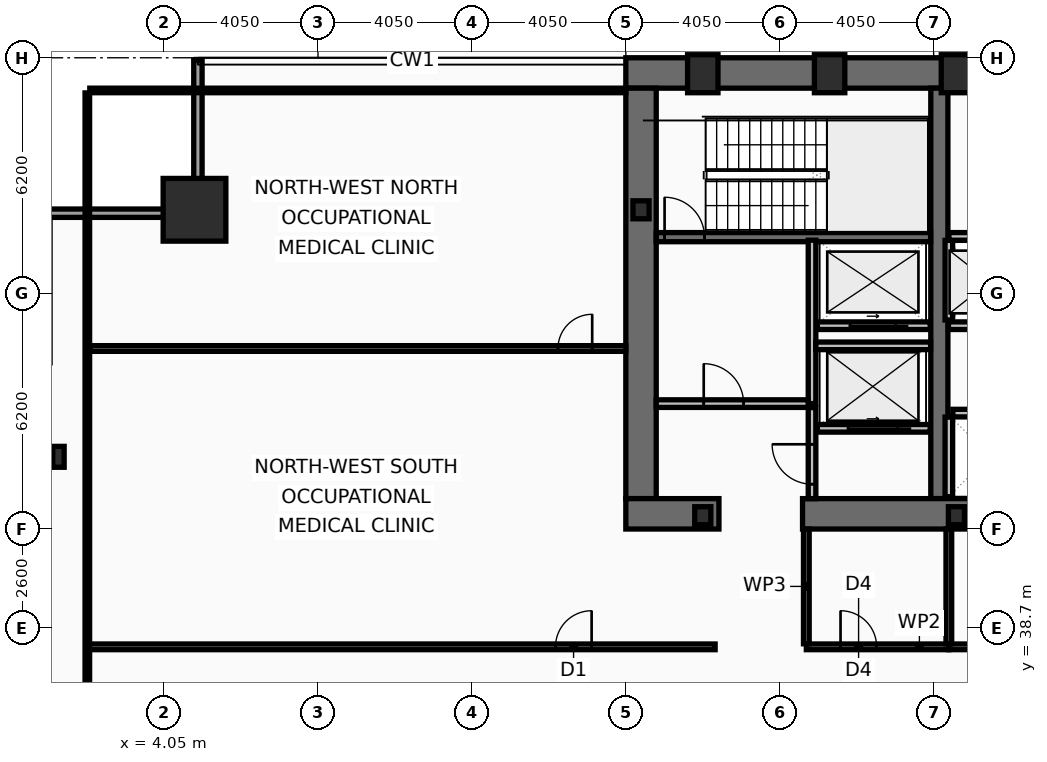
"""IFC4 building model, lengths in metres.
Left out: names, types, materials, properties, quantities, classifications, styles, units other than length and angle.
Written with IfcOpenShell. Run it as: python <this file> out.ifc"""

import sys

from ifc_helpers import new_model, si_unit, direction, frame, frame_2d, origin, origin_2d, place, context, subcontext, project, spatial, rectangle, hollow_rectangle, i_section, extrude, element, fill, save


model = new_model("IFC4")
c1 = context("Model", 3, precision=1e-05, world=origin(), true_north=direction((0.0, 1.0)))
c2 = subcontext(c1, "Body", "Model", "MODEL_VIEW")
j1 = project(units=[si_unit("LENGTHUNIT", "METRE"), si_unit("PLANEANGLEUNIT", "RADIAN")], contexts=[c1])
p1 = place(None, origin())
s1 = spatial("IfcSite", under=j1, at=p1, CompositionType="ELEMENT")
p2 = place(p1, origin())
s2 = spatial("IfcBuilding", under=s1, at=p2, CompositionType="ELEMENT")
p3 = place(p2, frame((0.0, 0.0, 69.8)))
s3 = spatial("IfcBuildingStorey", under=s2, at=p3, CompositionType="ELEMENT", Elevation=69.8)
p4 = place(p3, frame((16.2, 53.3, 0.0), z_axis=(0.0, 0.0, 1.0), x_axis=(1.0, 0.0, 0.0)))
e1 = element("IfcWall", 1, at=p4, inside=s3, PredefinedType="SHEAR", context=c2, shape_type="SweptSolid", body=[
    extrude(rectangle(XDim=40.5, YDim=0.8, at=frame_2d((20.25, 0.0))), origin(), (0.0, 0.0, 1.0), 3.82),
])
p5 = place(p3, frame((16.6, 42.1, 0.0), z_axis=(0.0, 0.0, 1.0), x_axis=(0.0, 1.0, 0.0)))
e2 = element("IfcWall", 2, at=p5, inside=s3, PredefinedType="SHEAR", context=c2, shape_type="SweptSolid", body=[
    extrude(rectangle(XDim=10.8, YDim=0.8, at=frame_2d((5.4, 0.0))), origin(), (0.0, 0.0, 1.0), 3.82),
])
p6 = place(p3, frame((24.45, 42.1, 0.0), z_axis=(0.0, 0.0, 1.0), x_axis=(0.0, 1.0, 0.0)))
e3 = element("IfcWall", 3, at=p6, inside=s3, PredefinedType="SHEAR", context=c2, shape_type="SweptSolid", body=[
    extrude(rectangle(XDim=10.8, YDim=0.45, at=frame_2d((5.4, 0.0))), origin(), (0.0, 0.0, 1.0), 3.82),
])
p7 = place(p3, frame((18.65, 41.7, 0.0), z_axis=(0.0, 0.0, 1.0), x_axis=(-1.0, 0.0, 0.0)))
e4 = element("IfcWall", 4, at=p7, inside=s3, PredefinedType="SHEAR", context=c2, shape_type="SweptSolid", body=[
    extrude(rectangle(XDim=2.45, YDim=0.8, at=frame_2d((1.225, 0.0))), origin(), (0.0, 0.0, 1.0), 3.82),
])
p8 = place(p3, frame((32.3, 41.7, 0.0), z_axis=(0.0, 0.0, 1.0), x_axis=(-1.0, 0.0, 0.0)))
e5 = element("IfcWall", 5, at=p8, inside=s3, PredefinedType="SHEAR", context=c2, shape_type="SweptSolid", body=[
    extrude(rectangle(XDim=11.45, YDim=0.8, at=frame_2d((5.725, 0.0))), origin(), (0.0, 0.0, 1.0), 3.82),
])
p9 = place(p3, frame((17.0, 48.98, 0.0), z_axis=(0.0, 0.0, 1.0), x_axis=(1.0, 0.0, 0.0)))
e6 = element("IfcWall", 6, at=p9, inside=s3, PredefinedType="SHEAR", context=c2, shape_type="SweptSolid", body=[
    extrude(rectangle(XDim=7.22, YDim=0.24, at=frame_2d((3.61, 0.0))), origin(), (0.0, 0.0, 1.0), 3.82),
])
p10 = place(p9, frame((0.22, 0.0, 0.0)))
e7 = element("IfcOpeningElement", 7, at=p10, cuts=e6, PredefinedType="OPENING", context=c2, shape_type="SweptSolid", body=[
    extrude(rectangle(XDim=1.05, YDim=2.15, at=frame_2d((0.525, 1.075))), frame((0.0, 0.13, 0.0), z_axis=(0.0, -1.0, 0.0), x_axis=(1.0, 0.0, 0.0)), (0.0, 0.0, 1.0), 0.26),
])
p11 = place(p3, frame((4.85, 49.7, 0.0), z_axis=(0.0, 0.0, 1.0), x_axis=(1.0, 0.0, 0.0)))
e8 = element("IfcColumn", 8, at=p11, inside=s3, PredefinedType="COLUMN", context=c2, shape_type="SweptSolid", body=[
    extrude(hollow_rectangle(XDim=1.65, YDim=1.65, WallThickness=0.075, at=origin_2d()), origin(), (0.0, 0.0, 1.0), 4.0),
])
for number, where, z_axis, x_axis in (
    (9, (18.225, 53.28, 0.0), (0.0, 0.0, 1.0), (1.0, 0.0, 0.0)),
    (10, (21.562, 53.28, 0.0), (0.0, 0.0, 1.0), (1.0, 0.0, 0.0)),
    (11, (24.9, 53.28, 0.0), (0.0, 0.0, 1.0), (1.0, 0.0, 0.0)),
):
    element("IfcColumn", number, at=place(p3, frame(where, z_axis=z_axis, x_axis=x_axis)), inside=s3, PredefinedType="COLUMN", context=c2, shape_type="SweptSolid", body=[
        extrude(hollow_rectangle(XDim=0.8, YDim=1.0, WallThickness=0.055, at=origin_2d()), origin(), (0.0, 0.0, 1.0), 4.0),
    ])
p12 = place(p3, frame((1.27, 43.2, 0.0), z_axis=(0.0, 0.0, 1.0), x_axis=(1.0, 0.0, 0.0)))
e12 = element("IfcColumn", 12, at=p12, inside=s3, PredefinedType="COLUMN", context=c2, shape_type="SweptSolid", body=[
    extrude(i_section(OverallWidth=0.3, OverallDepth=0.55, WebThickness=0.015, FlangeThickness=0.029, at=origin_2d()), origin(), (0.0, 0.0, 1.0), 4.0),
])
for number, where, z_axis, x_axis in (
    (13, (16.6, 49.7, 0.0), (0.0, 0.0, 1.0), (1.0, 0.0, 0.0)),
    (14, (18.225, 41.65, 0.0), (0.0, 0.0, 1.0), (1.0, 0.0, 0.0)),
    (15, (24.9, 41.65, 0.0), (0.0, 0.0, 1.0), (1.0, 0.0, 0.0)),
):
    element("IfcColumn", number, at=place(p3, frame(where, z_axis=z_axis, x_axis=x_axis)), inside=s3, PredefinedType="COLUMN", context=c2, shape_type="SweptSolid", body=[
        extrude(i_section(OverallWidth=0.424, OverallDepth=0.474, WebThickness=0.048, FlangeThickness=0.077, at=origin_2d()), origin(), (0.0, 0.0, 1.0), 4.0),
    ])
p13 = place(p3, frame((0.83, 49.61, 0.0), z_axis=(0.0, 0.0, 1.0), x_axis=(1.0, 0.0, 0.0)))
e16 = element("IfcWall", 16, at=p13, inside=s3, PredefinedType="SOLIDWALL", context=c2, shape_type="SweptSolid", body=[
    extrude(rectangle(XDim=4.22, YDim=0.22, at=frame_2d((2.11, 0.0))), origin(), (0.0, 0.0, 1.0), 3.16),
])
p14 = place(p3, frame((4.94, 49.72, 0.0), z_axis=(0.0, 0.0, 1.0), x_axis=(0.0, 1.0, 0.0)))
e17 = element("IfcWall", 17, at=p14, inside=s3, PredefinedType="SOLIDWALL", context=c2, shape_type="SweptSolid", body=[
    extrude(rectangle(XDim=3.91, YDim=0.22, at=frame_2d((1.955, 0.0))), origin(), (0.0, 0.0, 1.0), 3.16),
])
p15 = place(p3, frame((24.21, 43.95, 0.0), z_axis=(0.0, 0.0, 1.0), x_axis=(-1.0, 0.0, 0.0)))
e18 = element("IfcWall", 18, at=p15, inside=s3, PredefinedType="PARTITIONING", context=c2, shape_type="SweptSolid", body=[
    extrude(rectangle(XDim=2.97, YDim=0.2, at=frame_2d((1.485, 0.0))), origin(), (0.0, 0.0, 1.0), 3.82),
])
p16 = place(p15, frame((0.86, 0.0, 0.0)))
e19 = element("IfcOpeningElement", 19, at=p16, cuts=e18, PredefinedType="OPENING", context=c2, shape_type="SweptSolid", body=[
    extrude(rectangle(XDim=1.3, YDim=2.18, at=frame_2d((0.65, 1.09))), frame((0.0, 0.11, 0.0), z_axis=(0.0, -1.0, 0.0), x_axis=(1.0, 0.0, 0.0)), (0.0, 0.0, 1.0), 0.22),
])
p17 = place(p3, frame((24.21, 46.65, 0.0), z_axis=(0.0, 0.0, 1.0), x_axis=(-1.0, 0.0, 0.0)))
e20 = element("IfcWall", 20, at=p17, inside=s3, PredefinedType="PARTITIONING", context=c2, shape_type="SweptSolid", body=[
    extrude(rectangle(XDim=2.97, YDim=0.2, at=frame_2d((1.485, 0.0))), origin(), (0.0, 0.0, 1.0), 3.82),
])
p18 = place(p17, frame((0.91, 0.0, 0.0)))
e21 = element("IfcOpeningElement", 21, at=p18, cuts=e20, PredefinedType="OPENING", context=c2, shape_type="SweptSolid", body=[
    extrude(rectangle(XDim=1.2, YDim=2.18, at=frame_2d((0.6, 1.09))), frame((0.0, 0.11, 0.0), z_axis=(0.0, -1.0, 0.0), x_axis=(1.0, 0.0, 0.0)), (0.0, 0.0, 1.0), 0.22),
])
p19 = place(p3, frame((31.22, 46.65, 0.0), z_axis=(0.0, 0.0, 1.0), x_axis=(-1.0, 0.0, 0.0)))
e22 = element("IfcWall", 22, at=p19, inside=s3, PredefinedType="PARTITIONING", context=c2, shape_type="SweptSolid", body=[
    extrude(rectangle(XDim=6.53, YDim=0.2, at=frame_2d((3.265, 0.0))), origin(), (0.0, 0.0, 1.0), 3.82),
])
p20 = place(p19, frame((4.9, 0.0, 0.0)))
e23 = element("IfcOpeningElement", 23, at=p20, cuts=e22, PredefinedType="OPENING", context=c2, shape_type="SweptSolid", body=[
    extrude(rectangle(XDim=1.1, YDim=2.18, at=frame_2d((0.55, 1.09))), frame((0.0, 0.11, 0.0), z_axis=(0.0, -1.0, 0.0), x_axis=(1.0, 0.0, 0.0)), (0.0, 0.0, 1.0), 0.22),
])
p21 = place(p19, frame((2.74, 0.0, 0.0)))
e24 = element("IfcOpeningElement", 24, at=p21, cuts=e22, PredefinedType="OPENING", context=c2, shape_type="SweptSolid", body=[
    extrude(rectangle(XDim=1.1, YDim=2.18, at=frame_2d((0.55, 1.09))), frame((0.0, 0.11, 0.0), z_axis=(0.0, -1.0, 0.0), x_axis=(1.0, 0.0, 0.0)), (0.0, 0.0, 1.0), 0.22),
])
p22 = place(p19, frame((0.58, 0.0, 0.0)))
e25 = element("IfcOpeningElement", 25, at=p22, cuts=e22, PredefinedType="OPENING", context=c2, shape_type="SweptSolid", body=[
    extrude(rectangle(XDim=1.1, YDim=2.18, at=frame_2d((0.55, 1.09))), frame((0.0, 0.11, 0.0), z_axis=(0.0, -1.0, 0.0), x_axis=(1.0, 0.0, 0.0)), (0.0, 0.0, 1.0), 0.22),
])
p23 = place(p3, frame((21.1, 44.6, 0.0), z_axis=(0.0, 0.0, 1.0), x_axis=(0.0, 1.0, 0.0)))
e26 = element("IfcWall", 26, at=p23, inside=s3, PredefinedType="PARTITIONING", context=c2, shape_type="SweptSolid", body=[
    extrude(rectangle(XDim=4.3, YDim=0.2, at=frame_2d((2.15, 0.0))), origin(), (0.0, 0.0, 1.0), 3.82),
])
p24 = place(p3, frame((17.0, 44.6, 0.0), z_axis=(0.0, 0.0, 1.0), x_axis=(1.0, 0.0, 0.0)))
e27 = element("IfcWall", 27, at=p24, inside=s3, PredefinedType="PARTITIONING", context=c2, shape_type="SweptSolid", body=[
    extrude(rectangle(XDim=4.0, YDim=0.2, at=frame_2d((2.0, 0.0))), origin(), (0.0, 0.0, 1.0), 3.82),
])
p25 = place(p24, frame((1.25, 0.0, 0.0)))
e28 = element("IfcOpeningElement", 28, at=p25, cuts=e27, PredefinedType="OPENING", context=c2, shape_type="SweptSolid", body=[
    extrude(rectangle(XDim=1.05, YDim=2.15, at=frame_2d((0.525, 1.075))), frame((0.0, 0.11, 0.0), z_axis=(0.0, -1.0, 0.0), x_axis=(1.0, 0.0, 0.0)), (0.0, 0.0, 1.0), 0.22),
])
p26 = place(p3, frame((21.2, 46.12, 0.0), z_axis=(0.0, 0.0, 1.0), x_axis=(1.0, 0.0, 0.0)))
e29 = element("IfcWall", 29, at=p26, inside=s3, PredefinedType="PARTITIONING", context=c2, shape_type="SweptSolid", body=[
    extrude(rectangle(XDim=3.02, YDim=0.2, at=frame_2d((1.51, 0.0))), origin(), (0.0, 0.0, 1.0), 3.82),
])
p27 = place(p3, frame((21.1, 42.1, 0.0), z_axis=(0.0, 0.0, 1.0), x_axis=(0.0, 1.0, 0.0)))
e30 = element("IfcWall", 30, at=p27, inside=s3, PredefinedType="PARTITIONING", context=c2, shape_type="SweptSolid", body=[
    extrude(rectangle(XDim=2.395, YDim=0.2, at=frame_2d((1.198, 0.0))), origin(), (0.0, 0.0, 1.0), 3.82),
])
p28 = place(p27, frame((0.38, 0.0, 0.0)))
e31 = element("IfcOpeningElement", 31, at=p28, cuts=e30, PredefinedType="OPENING", context=c2, shape_type="SweptSolid", body=[
    extrude(rectangle(XDim=1.05, YDim=2.15, at=frame_2d((0.525, 1.075))), frame((0.0, 0.11, 0.0), z_axis=(0.0, -1.0, 0.0), x_axis=(1.0, 0.0, 0.0)), (0.0, 0.0, 1.0), 0.22),
])
p29 = place(p3, frame((24.7, 46.8, 0.0), z_axis=(0.0, 0.0, 1.0), x_axis=(0.0, 1.0, 0.0)))
e32 = element("IfcWall", 32, at=p29, inside=s3, PredefinedType="PARTITIONING", context=c2, shape_type="SweptSolid", body=[
    extrude(rectangle(XDim=2.095, YDim=0.2, at=frame_2d((1.047, 0.0))), origin(), (0.0, 0.0, 1.0), 3.82),
])
p30 = place(p3, frame((24.805, 44.35, 0.0), z_axis=(0.0, 0.0, 1.0), x_axis=(1.0, 0.0, 0.0)))
e33 = element("IfcWall", 33, at=p30, inside=s3, PredefinedType="PARTITIONING", context=c2, shape_type="SweptSolid", body=[
    extrude(rectangle(XDim=6.27, YDim=0.2, at=frame_2d((3.135, 0.0))), origin(), (0.0, 0.0, 1.0), 3.82),
])
p31 = place(p3, frame((24.7, 42.15, 0.0), z_axis=(0.0, 0.0, 1.0), x_axis=(0.0, 1.0, 0.0)))
e34 = element("IfcWall", 34, at=p31, inside=s3, PredefinedType="PARTITIONING", context=c2, shape_type="SweptSolid", body=[
    extrude(rectangle(XDim=2.095, YDim=0.2, at=frame_2d((1.048, 0.0))), origin(), (0.0, 0.0, 1.0), 3.82),
])
p32 = place(p3, frame((24.7, 52.86, 0.0), z_axis=(0.0, 0.0, 1.0), x_axis=(1.0, 0.0, 0.0)))
e35 = element("IfcWall", 35, at=p32, inside=s3, PredefinedType="PARTITIONING", context=c2, shape_type="SweptSolid", body=[
    extrude(rectangle(XDim=7.72, YDim=0.12, at=frame_2d((3.86, 0.0))), origin(), (0.0, 0.0, 1.0), 3.82),
])
p33 = place(p3, frame((24.7, 49.0, 0.0), z_axis=(0.0, 0.0, 1.0), x_axis=(1.0, 0.0, 0.0)))
e36 = element("IfcWall", 36, at=p33, inside=s3, PredefinedType="PARTITIONING", context=c2, shape_type="SweptSolid", body=[
    extrude(rectangle(XDim=7.72, YDim=0.2, at=frame_2d((3.86, 0.0))), origin(), (0.0, 0.0, 1.0), 3.82),
])
p34 = place(p33, frame((6.56, 0.0, 0.0)))
e37 = element("IfcOpeningElement", 37, at=p34, cuts=e36, PredefinedType="OPENING", context=c2, shape_type="SweptSolid", body=[
    extrude(rectangle(XDim=0.95, YDim=2.1, at=frame_2d((0.475, 1.05))), frame((0.0, 0.11, 0.0), z_axis=(0.0, -1.0, 0.0), x_axis=(1.0, 0.0, 0.0)), (0.0, 0.0, 1.0), 0.22),
])
p35 = place(p3, frame((20.95, 38.2, 0.0), z_axis=(0.0, 0.0, 1.0), x_axis=(1.0, 0.0, 0.0)))
e38 = element("IfcWall", 38, at=p35, inside=s3, PredefinedType="PARTITIONING", context=c2, shape_type="SweptSolid", body=[
    extrude(rectangle(XDim=3.75, YDim=0.15, at=frame_2d((1.875, 0.0))), origin(), (0.0, 0.0, 1.0), 3.01),
])
p36 = place(p35, frame((0.9, 0.0, 0.0)))
e39 = element("IfcOpeningElement", 39, at=p36, cuts=e38, PredefinedType="OPENING", context=c2, shape_type="SweptSolid", body=[
    extrude(rectangle(XDim=0.95, YDim=2.05, at=frame_2d((0.475, 1.025))), frame((0.0, 0.085, 0.0), z_axis=(0.0, -1.0, 0.0), x_axis=(1.0, 0.0, 0.0)), (0.0, 0.0, 1.0), 0.17),
])
p37 = place(p3, frame((24.7, 38.2, 0.0), z_axis=(0.0, 0.0, 1.0), x_axis=(1.0, 0.0, 0.0)))
e40 = element("IfcWall", 40, at=p37, inside=s3, PredefinedType="PARTITIONING", context=c2, shape_type="SweptSolid", body=[
    extrude(rectangle(XDim=4.5, YDim=0.15, at=frame_2d((2.25, 0.0))), origin(), (0.0, 0.0, 1.0), 3.01),
])
p38 = place(p37, frame((0.9, 0.0, 0.0)))
e41 = element("IfcOpeningElement", 41, at=p38, cuts=e40, PredefinedType="OPENING", context=c2, shape_type="SweptSolid", body=[
    extrude(rectangle(XDim=0.95, YDim=2.05, at=frame_2d((0.475, 1.025))), frame((0.0, 0.085, 0.0), z_axis=(0.0, -1.0, 0.0), x_axis=(1.0, 0.0, 0.0)), (0.0, 0.0, 1.0), 0.17),
])
p39 = place(p3, frame((20.95, 38.28, 0.0), z_axis=(0.0, 0.0, 1.0), x_axis=(0.0, 1.0, 0.0)))
e42 = element("IfcWall", 42, at=p39, inside=s3, PredefinedType="PARTITIONING", context=c2, shape_type="SweptSolid", body=[
    extrude(rectangle(XDim=3.02, YDim=0.15, at=frame_2d((1.51, 0.0))), origin(), (0.0, 0.0, 1.0), 3.82),
])
p40 = place(p3, frame((24.7, 38.28, 0.0), z_axis=(0.0, 0.0, 1.0), x_axis=(0.0, 1.0, 0.0)))
e43 = element("IfcWall", 43, at=p40, inside=s3, PredefinedType="PARTITIONING", context=c2, shape_type="SweptSolid", body=[
    extrude(rectangle(XDim=3.02, YDim=0.15, at=frame_2d((1.51, 0.0))), origin(), (0.0, 0.0, 1.0), 3.01),
])
p41 = place(p3, frame((2.03, 38.2, 0.0), z_axis=(0.0, 0.0, 1.0), x_axis=(1.0, 0.0, 0.0)))
e44 = element("IfcWall", 44, at=p41, inside=s3, PredefinedType="PARTITIONING", context=c2, shape_type="SweptSolid", body=[
    extrude(rectangle(XDim=16.52, YDim=0.15, at=frame_2d((8.26, 0.0))), origin(), (0.0, 0.0, 1.0), 3.01),
])
p42 = place(p41, frame((12.32, 0.0, 0.0)))
e45 = element("IfcOpeningElement", 45, at=p42, cuts=e44, PredefinedType="OPENING", context=c2, shape_type="SweptSolid", body=[
    extrude(rectangle(XDim=0.95, YDim=2.05, at=frame_2d((0.475, 1.025))), frame((0.0, 0.085, 0.0), z_axis=(0.0, -1.0, 0.0), x_axis=(1.0, 0.0, 0.0)), (0.0, 0.0, 1.0), 0.17),
])
p43 = place(p3, frame((2.095, 46.05, 0.0), z_axis=(0.0, 0.0, 1.0), x_axis=(1.0, 0.0, 0.0)))
e46 = element("IfcWall", 46, at=p43, inside=s3, PredefinedType="PARTITIONING", context=c2, shape_type="SweptSolid", body=[
    extrude(rectangle(XDim=14.105, YDim=0.15, at=frame_2d((7.052, 0.0))), origin(), (0.0, 0.0, 1.0), 3.16),
])
p44 = place(p43, frame((12.32, 0.0, 0.0)))
e47 = element("IfcOpeningElement", 47, at=p44, cuts=e46, PredefinedType="OPENING", context=c2, shape_type="SweptSolid", body=[
    extrude(rectangle(XDim=0.9, YDim=2.05, at=frame_2d((0.45, 1.025))), frame((0.0, 0.085, 0.0), z_axis=(0.0, -1.0, 0.0), x_axis=(1.0, 0.0, 0.0)), (0.0, 0.0, 1.0), 0.17),
])
p45 = place(p3, frame((2.03, 10.665, 0.0), z_axis=(0.0, 0.0, 1.0), x_axis=(0.0, 1.0, 0.0)))
e48 = element("IfcWall", 48, at=p45, inside=s3, PredefinedType="PARTITIONING", context=c2, shape_type="SweptSolid", body=[
    extrude(rectangle(XDim=42.11, YDim=0.12, at=frame_2d((21.055, 0.0))), origin(), (0.0, 0.0, 1.0), 3.01),
])
p46 = place(p3, frame((2.095, 52.84, 0.0), z_axis=(0.0, 0.0, 1.0), x_axis=(1.0, 0.0, 0.0)))
e49 = element("IfcWall", 49, at=p46, inside=s3, PredefinedType="PARTITIONING", context=c2, shape_type="SweptSolid", body=[
    extrude(rectangle(XDim=14.105, YDim=0.12, at=frame_2d((7.052, 0.0))), origin(), (0.0, 0.0, 1.0), 3.82),
])
p47 = place(p10, origin())
e50 = element("IfcDoor", 50, at=p47, inside=s3, OperationType="SINGLE_SWING_LEFT", PredefinedType="DOOR", context=c2, shape_type="SweptSolid", body=[
    extrude(rectangle(XDim=1.05, YDim=2.15, at=frame_2d((0.525, 1.075))), frame((0.0, 0.025, 0.0), z_axis=(0.0, -1.0, 0.0), x_axis=(1.0, 0.0, 0.0)), (0.0, 0.0, 1.0), 0.05),
])
fill(e7, e50)
p48 = place(p16, origin())
e51 = element("IfcDoor", 51, at=p48, inside=s3, OperationType="SLIDING_TO_LEFT", PredefinedType="DOOR", context=c2, shape_type="SweptSolid", body=[
    extrude(rectangle(XDim=1.3, YDim=2.18, at=frame_2d((0.65, 1.09))), frame((0.0, 0.025, 0.0), z_axis=(0.0, -1.0, 0.0), x_axis=(1.0, 0.0, 0.0)), (0.0, 0.0, 1.0), 0.05),
])
fill(e19, e51)
p49 = place(p18, origin())
e52 = element("IfcDoor", 52, at=p49, inside=s3, OperationType="SLIDING_TO_LEFT", PredefinedType="DOOR", context=c2, shape_type="SweptSolid", body=[
    extrude(rectangle(XDim=1.2, YDim=2.18, at=frame_2d((0.6, 1.09))), frame((0.0, 0.025, 0.0), z_axis=(0.0, -1.0, 0.0), x_axis=(1.0, 0.0, 0.0)), (0.0, 0.0, 1.0), 0.05),
])
fill(e21, e52)
p50 = place(p25, origin())
e53 = element("IfcDoor", 53, at=p50, inside=s3, OperationType="SINGLE_SWING_LEFT", PredefinedType="DOOR", context=c2, shape_type="SweptSolid", body=[
    extrude(rectangle(XDim=1.05, YDim=2.15, at=frame_2d((0.525, 1.075))), frame((0.0, 0.025, 0.0), z_axis=(0.0, -1.0, 0.0), x_axis=(1.0, 0.0, 0.0)), (0.0, 0.0, 1.0), 0.05),
])
fill(e28, e53)
p51 = place(p28, origin())
e54 = element("IfcDoor", 54, at=p51, inside=s3, OperationType="SINGLE_SWING_RIGHT", PredefinedType="DOOR", context=c2, shape_type="SweptSolid", body=[
    extrude(rectangle(XDim=1.05, YDim=2.15, at=frame_2d((0.525, 1.075))), frame((0.0, 0.025, 0.0), z_axis=(0.0, -1.0, 0.0), x_axis=(1.0, 0.0, 0.0)), (0.0, 0.0, 1.0), 0.05),
])
fill(e31, e54)
p52 = place(p36, origin())
e55 = element("IfcDoor", 55, at=p52, inside=s3, OperationType="SINGLE_SWING_LEFT", PredefinedType="DOOR", context=c2, shape_type="SweptSolid", body=[
    extrude(rectangle(XDim=0.95, YDim=2.05, at=frame_2d((0.475, 1.025))), frame((0.0, 0.025, 0.0), z_axis=(0.0, -1.0, 0.0), x_axis=(1.0, 0.0, 0.0)), (0.0, 0.0, 1.0), 0.05),
])
fill(e39, e55)
p53 = place(p42, origin())
e56 = element("IfcDoor", 56, at=p53, inside=s3, OperationType="SINGLE_SWING_RIGHT", PredefinedType="DOOR", context=c2, shape_type="SweptSolid", body=[
    extrude(rectangle(XDim=0.95, YDim=2.05, at=frame_2d((0.475, 1.025))), frame((0.0, 0.025, 0.0), z_axis=(0.0, -1.0, 0.0), x_axis=(1.0, 0.0, 0.0)), (0.0, 0.0, 1.0), 0.05),
])
fill(e45, e56)
p54 = place(p44, origin())
e57 = element("IfcDoor", 57, at=p54, inside=s3, OperationType="SINGLE_SWING_RIGHT", PredefinedType="DOOR", context=c2, shape_type="SweptSolid", body=[
    extrude(rectangle(XDim=0.9, YDim=2.05, at=frame_2d((0.45, 1.025))), frame((0.0, 0.025, 0.0), z_axis=(0.0, -1.0, 0.0), x_axis=(1.0, 0.0, 0.0)), (0.0, 0.0, 1.0), 0.05),
])
fill(e47, e57)
save(model, sys.argv[1])
